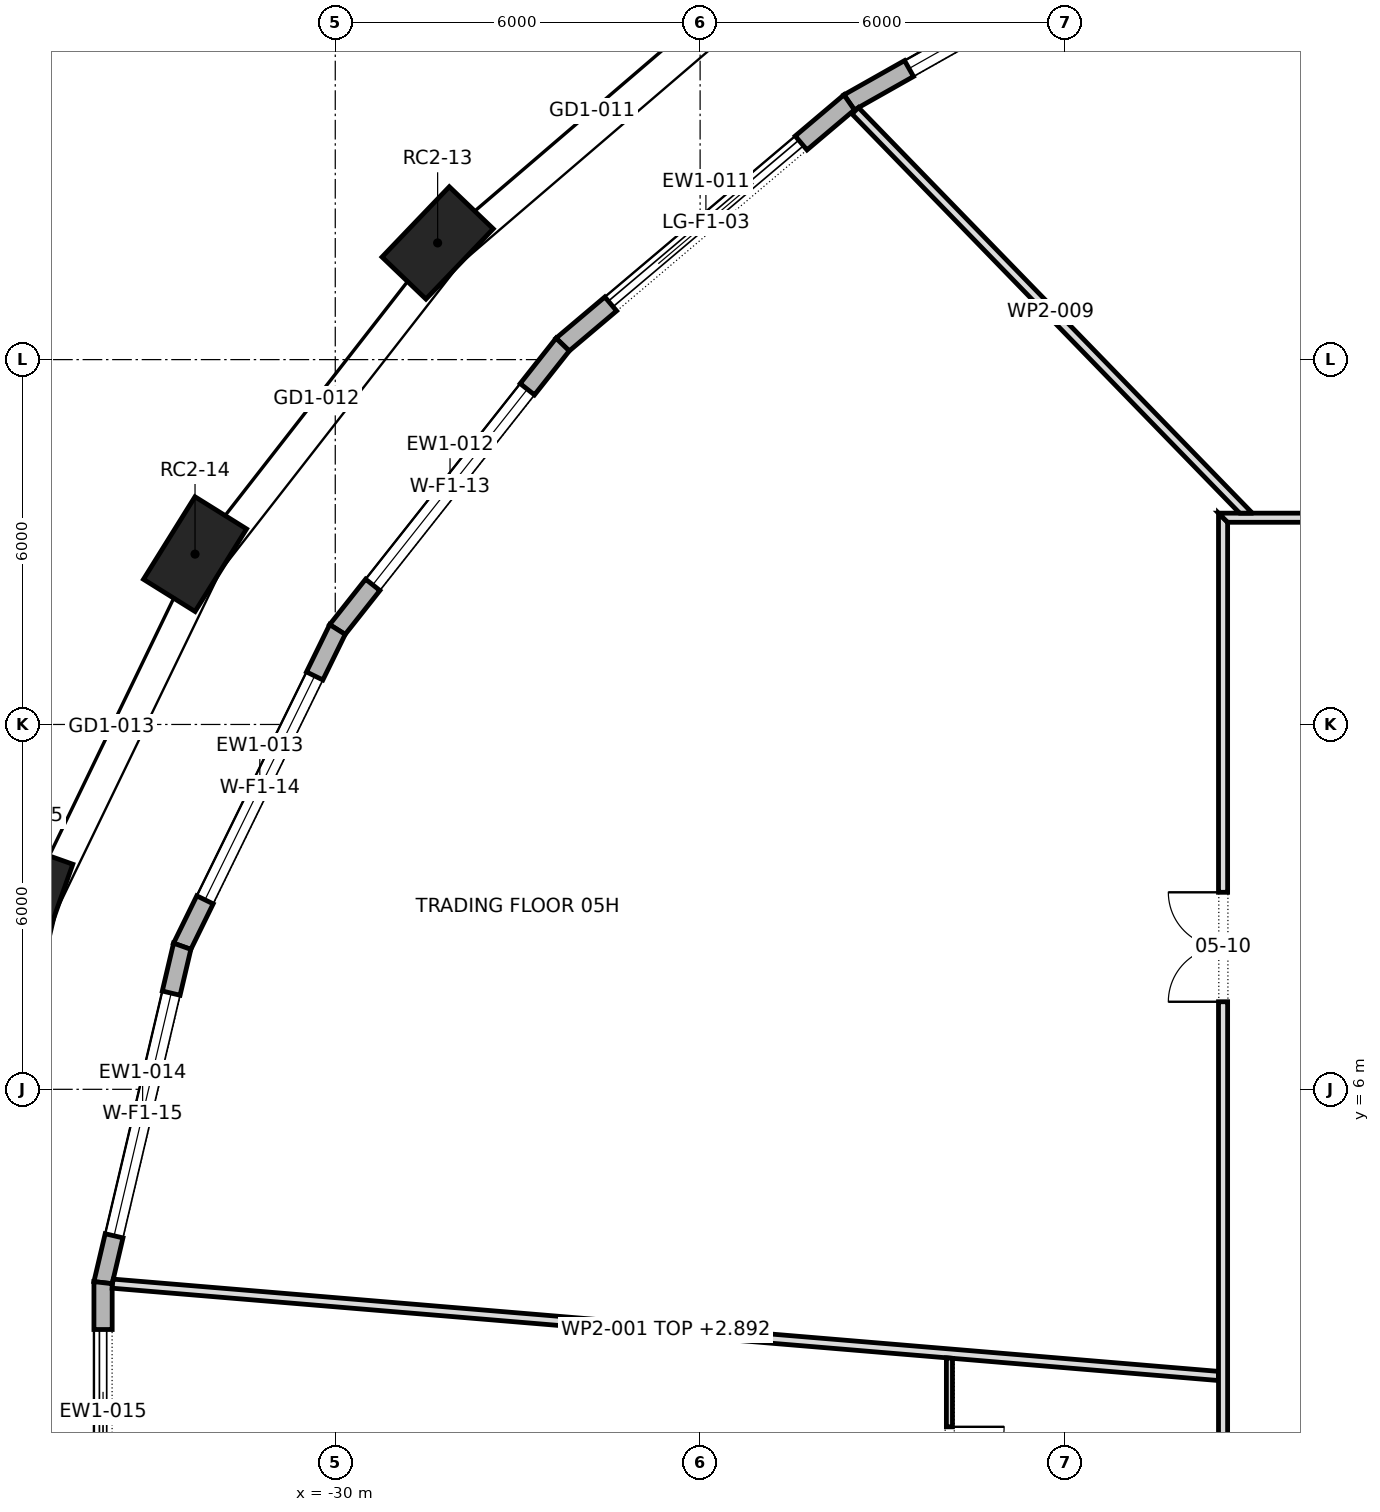
"""IFC4 building model, lengths in metres.
Left out: names, types, materials, properties, quantities, classifications, styles, units other than length and angle.
Written with IfcOpenShell. Run it as: python <this file> out.ifc"""

import sys

from ifc_helpers import new_model, si_unit, direction, frame, frame_2d, origin, origin_2d, place, context, subcontext, project, spatial, polyline, rectangle, outline, extrude, element, fill, save


model = new_model("IFC4")
c1 = context("Model", 3, precision=1e-05, world=origin(), true_north=direction((0.0, 1.0)))
c2 = subcontext(c1, "Body", "Model", "MODEL_VIEW")
j1 = project(units=[si_unit("LENGTHUNIT", "METRE"), si_unit("PLANEANGLEUNIT", "RADIAN")], contexts=[c1])
p1 = place(None, origin())
s1 = spatial("IfcSite", under=j1, at=p1, CompositionType="ELEMENT")
p2 = place(p1, origin())
s2 = spatial("IfcBuilding", under=s1, at=p2, CompositionType="ELEMENT")
p3 = place(p2, frame((0.0, 0.0, 73.9)))
s3 = spatial("IfcBuildingStorey", under=s2, at=p3, CompositionType="ELEMENT", Elevation=73.9)
for number, where, z_axis, x_axis in (
    (1, (-28.317, 19.919, 0.0), (0.0, 0.0, 1.0), (-0.692, -0.722, 0.0)),
    (2, (-32.306, 14.801, 0.0), (0.0, 0.0, 1.0), (-0.529, -0.849, 0.0)),
    (3, (-35.054, 9.115, 0.0), (0.0, 0.0, 1.0), (-0.334, -0.943, 0.0)),
):
    element("IfcColumn", number, at=place(p3, frame(where, z_axis=z_axis, x_axis=x_axis)), inside=s3, PredefinedType="COLUMN", context=c2, shape_type="SweptSolid", body=[
        extrude(rectangle(XDim=1.6, YDim=1.0, at=origin_2d()), origin(), (0.0, 0.0, 1.0), 4.2),
    ])
p4 = place(p3, frame((-16.01, 25.359, 0.0), z_axis=(0.0, 0.0, 1.0), x_axis=(-0.870710061474, -0.491796694629, 0.0)))
e4 = element("IfcWall", 4, at=p4, inside=s3, PredefinedType="STANDARD", context=c2, shape_type="SweptSolid", body=[
    extrude(outline(polyline([(-0.013, -0.15), (6.375, -0.15), (6.346, 0.15), (0.013, 0.15), (-0.013, -0.15)])), origin(), (0.0, 0.0, 1.0), 3.9),
])
p5 = place(p4, frame((1.13, 0.0, 0.6)))
e5 = element("IfcOpeningElement", 5, at=p5, cuts=e4, PredefinedType="OPENING", context=c2, shape_type="SweptSolid", body=[
    extrude(rectangle(XDim=4.1, YDim=2.85, at=frame_2d((2.05, 1.425))), frame((0.0, 0.162, 0.0), z_axis=(0.0, -1.0, 0.0), x_axis=(1.0, 0.0, 0.0)), (0.0, 0.0, 1.0), 0.324),
])
p6 = place(p3, frame((-21.549, 22.231, 0.0), z_axis=(0.0, 0.0, 1.0), x_axis=(-0.763693886759, -0.645578536916, 0.0)))
e6 = element("IfcWall", 6, at=p6, inside=s3, PredefinedType="STANDARD", context=c2, shape_type="SweptSolid", body=[
    extrude(outline(polyline([(-0.014, -0.15), (6.185, -0.15), (6.155, 0.15), (0.014, 0.15), (-0.014, -0.15)])), origin(), (0.0, 0.0, 1.0), 3.9),
])
p7 = place(p6, frame((1.035, 0.0, 0.0)))
e7 = element("IfcOpeningElement", 7, at=p7, cuts=e6, PredefinedType="OPENING", context=c2, shape_type="SweptSolid", body=[
    extrude(rectangle(XDim=4.1, YDim=3.45, at=frame_2d((2.05, 1.725))), frame((0.0, 0.162, 0.0), z_axis=(0.0, -1.0, 0.0), x_axis=(1.0, 0.0, 0.0)), (0.0, 0.0, 1.0), 0.324),
])
p8 = place(p3, frame((-26.26, 18.248, 0.0), z_axis=(0.0, 0.0, 1.0), x_axis=(-0.620093447965, -0.784527957303, 0.0)))
e8 = element("IfcWall", 8, at=p8, inside=s3, PredefinedType="STANDARD", context=c2, shape_type="SweptSolid", body=[
    extrude(outline(polyline([(-0.015, -0.15), (5.989, -0.15), (5.957, 0.15), (0.015, 0.15), (-0.015, -0.15)])), origin(), (0.0, 0.0, 1.0), 3.9),
])
p9 = place(p8, frame((0.937, 0.0, 0.6)))
e9 = element("IfcOpeningElement", 9, at=p9, cuts=e8, PredefinedType="OPENING", context=c2, shape_type="SweptSolid", body=[
    extrude(rectangle(XDim=4.1, YDim=2.85, at=frame_2d((2.05, 1.425))), frame((0.0, 0.162, 0.0), z_axis=(0.0, -1.0, 0.0), x_axis=(1.0, 0.0, 0.0)), (0.0, 0.0, 1.0), 0.324),
])
p10 = place(p3, frame((-29.964, 13.562, 0.0), z_axis=(0.0, 0.0, 1.0), x_axis=(-0.440027465772, -0.897984314655, 0.0)))
e10 = element("IfcWall", 10, at=p10, inside=s3, PredefinedType="STANDARD", context=c2, shape_type="SweptSolid", body=[
    extrude(outline(polyline([(-0.016, -0.15), (5.818, -0.15), (5.784, 0.15), (0.016, 0.15), (-0.016, -0.15)])), origin(), (0.0, 0.0, 1.0), 3.9),
])
p11 = place(p10, frame((0.85, 0.0, 0.6)))
e11 = element("IfcOpeningElement", 11, at=p11, cuts=e10, PredefinedType="OPENING", context=c2, shape_type="SweptSolid", body=[
    extrude(rectangle(XDim=4.1, YDim=2.85, at=frame_2d((2.05, 1.425))), frame((0.0, 0.162, 0.0), z_axis=(0.0, -1.0, 0.0), x_axis=(1.0, 0.0, 0.0)), (0.0, 0.0, 1.0), 0.324),
])
p12 = place(p3, frame((-32.517, 8.353, 0.0), z_axis=(0.0, 0.0, 1.0), x_axis=(-0.229058489262, -0.97341266095, 0.0)))
e12 = element("IfcWall", 12, at=p12, inside=s3, PredefinedType="STANDARD", context=c2, shape_type="SweptSolid", body=[
    extrude(outline(polyline([(-0.017, -0.15), (5.7, -0.15), (5.666, 0.15), (0.017, 0.15), (-0.017, -0.15)])), origin(), (0.0, 0.0, 1.0), 3.9),
])
p13 = place(p12, frame((0.792, 0.0, 0.6)))
e13 = element("IfcOpeningElement", 13, at=p13, cuts=e12, PredefinedType="OPENING", context=c2, shape_type="SweptSolid", body=[
    extrude(rectangle(XDim=4.1, YDim=2.85, at=frame_2d((2.05, 1.425))), frame((0.0, 0.162, 0.0), z_axis=(0.0, -1.0, 0.0), x_axis=(1.0, 0.0, 0.0)), (0.0, 0.0, 1.0), 0.324),
])
p14 = place(p3, frame((-33.819, 2.821, 0.0), z_axis=(0.0, 0.0, 1.0), x_axis=(0.0, -1.0, 0.0)))
e14 = element("IfcWall", 14, at=p14, inside=s3, PredefinedType="STANDARD", context=c2, shape_type="SweptSolid", body=[
    extrude(outline(polyline([(-0.017, -0.15), (5.658, -0.15), (5.624, 0.15), (0.017, 0.15), (-0.017, -0.15)])), origin(), (0.0, 0.0, 1.0), 3.9),
])
p15 = place(p14, frame((0.771, 0.0, 0.0)))
e15 = element("IfcOpeningElement", 15, at=p15, cuts=e14, PredefinedType="OPENING", context=c2, shape_type="SweptSolid", body=[
    extrude(rectangle(XDim=4.1, YDim=3.45, at=frame_2d((2.05, 1.725))), frame((0.0, 0.162, 0.0), z_axis=(0.0, -1.0, 0.0), x_axis=(1.0, 0.0, 0.0)), (0.0, 0.0, 1.0), 0.324),
])
p16 = place(p3, frame((-33.662, 2.804, 0.0), z_axis=(0.0, 0.0, 1.0), x_axis=(0.996534589799, -0.083179392484, 0.0)))
e16 = element("IfcWall", 16, at=p16, inside=s3, PredefinedType="PARTITIONING", context=c2, shape_type="SweptSolid", body=[
    extrude(outline(polyline([(18.256, -0.075), (18.256, -0.069), (18.244, 0.075), (16.42, 0.075), (14.596, 0.075), (12.773, 0.075), (10.949, 0.075), (9.125, 0.075), (7.301, 0.075), (5.477, 0.075), (3.653, 0.075), (1.829, 0.075), (0.005, 0.075), (0.0, 0.04), (0.0, -0.075), (1.826, -0.075), (3.651, -0.075), (5.477, -0.075), (7.302, -0.075), (9.128, -0.075), (10.954, -0.075), (12.78, -0.075), (14.605, -0.075), (16.431, -0.075), (18.256, -0.075)])), origin(), (0.0, 0.0, 1.0), 2.892),
])
p17 = place(p3, frame((-19.9, -13.744, 0.0), z_axis=(0.0, 0.0, 1.0), x_axis=(0.0, 1.0, 0.0)))
e17 = element("IfcWall", 17, at=p17, inside=s3, PredefinedType="PARTITIONING", context=c2, shape_type="SweptSolid", body=[
    extrude(outline(polyline([(0.069, -0.05), (1.976, -0.05), (3.882, -0.05), (5.788, -0.05), (7.695, -0.05), (9.601, -0.05), (11.508, -0.05), (13.414, -0.05), (15.321, -0.05), (15.329, 0.049), (15.329, 0.05), (13.644, 0.05), (11.958, 0.05), (10.273, 0.05), (8.588, 0.05), (8.58, 0.048), (8.58, 0.05), (6.864, 0.05), (5.148, 0.05), (3.432, 0.05), (1.716, 0.05), (0.0, 0.05), (0.0, 0.05), (0.069, -0.05)])), origin(), (0.0, 0.0, 1.0), 3.9),
])
p18 = place(p17, frame((3.844, 0.0, 0.0)))
e18 = element("IfcOpeningElement", 18, at=p18, cuts=e17, PredefinedType="OPENING", context=c2, shape_type="SweptSolid", body=[
    extrude(rectangle(XDim=0.9, YDim=2.1, at=frame_2d((0.45, 1.05))), frame((0.0, 0.062, 0.0), z_axis=(0.0, -1.0, 0.0), x_axis=(1.0, 0.0, 0.0)), (0.0, 0.0, 1.0), 0.124),
])
p19 = place(p17, frame((13.294, 0.0, 0.0)))
e19 = element("IfcOpeningElement", 19, at=p19, cuts=e17, PredefinedType="OPENING", context=c2, shape_type="SweptSolid", body=[
    extrude(rectangle(XDim=0.9, YDim=2.1, at=frame_2d((0.45, 1.05))), frame((0.0, 0.062, 0.0), z_axis=(0.0, -1.0, 0.0), x_axis=(1.0, 0.0, 0.0)), (0.0, 0.0, 1.0), 0.124),
])
p20 = place(p3, frame((-15.4, -15.475, 0.0), z_axis=(0.0, 0.0, 1.0), x_axis=(0.0, 1.0, 0.0)))
e20 = element("IfcWall", 20, at=p20, inside=s3, PredefinedType="PARTITIONING", context=c2, shape_type="SweptSolid", body=[
    extrude(outline(polyline([(0.15, -0.075), (2.066, -0.075), (3.981, -0.075), (5.897, -0.075), (7.812, -0.075), (9.728, -0.075), (11.644, -0.075), (13.56, -0.075), (15.475, -0.075), (17.391, -0.075), (19.306, -0.075), (21.222, -0.075), (23.138, -0.075), (25.053, -0.075), (26.969, -0.075), (28.885, -0.075), (30.8, -0.075), (30.95, 0.075), (29.016, 0.075), (27.081, 0.075), (25.147, 0.075), (23.212, 0.075), (21.278, 0.075), (19.344, 0.075), (17.409, 0.075), (15.475, 0.075), (13.541, 0.075), (11.606, 0.075), (9.672, 0.075), (7.738, 0.075), (5.803, 0.075), (3.869, 0.075), (1.935, 0.075), (0.0, 0.075), (0.15, -0.075)])), origin(), (0.0, 0.0, 1.0), 3.9),
])
p21 = place(p20, frame((10.275, 0.0, 0.0)))
e21 = element("IfcOpeningElement", 21, at=p21, cuts=e20, PredefinedType="OPENING", context=c2, shape_type="SweptSolid", body=[
    extrude(rectangle(XDim=1.0, YDim=2.1, at=frame_2d((0.5, 1.05))), frame((0.0, 0.087, 0.0), z_axis=(0.0, -1.0, 0.0), x_axis=(1.0, 0.0, 0.0)), (0.0, 0.0, 1.0), 0.174),
])
p22 = place(p20, frame((22.915, 0.0, 0.0)))
e22 = element("IfcOpeningElement", 22, at=p22, cuts=e20, PredefinedType="OPENING", context=c2, shape_type="SweptSolid", body=[
    extrude(rectangle(XDim=1.8, YDim=2.1, at=frame_2d((0.9, 1.05))), frame((0.0, 0.087, 0.0), z_axis=(0.0, -1.0, 0.0), x_axis=(1.0, 0.0, 0.0)), (0.0, 0.0, 1.0), 0.174),
])
p23 = place(p3, frame((-15.475, 15.4, 0.0), z_axis=(0.0, 0.0, 1.0), x_axis=(1.0, 0.0, 0.0)))
e23 = element("IfcWall", 23, at=p23, inside=s3, PredefinedType="PARTITIONING", context=c2, shape_type="SweptSolid", body=[
    extrude(outline(polyline([(0.15, -0.075), (2.066, -0.075), (3.981, -0.075), (5.897, -0.075), (7.812, -0.075), (9.728, -0.075), (11.644, -0.075), (13.56, -0.075), (15.475, -0.075), (17.391, -0.075), (19.306, -0.075), (21.222, -0.075), (23.138, -0.075), (25.053, -0.075), (26.969, -0.075), (28.885, -0.075), (30.8, -0.075), (30.95, 0.075), (29.016, 0.075), (27.081, 0.075), (25.147, 0.075), (23.212, 0.075), (21.278, 0.075), (19.344, 0.075), (17.409, 0.075), (15.475, 0.075), (13.541, 0.075), (11.606, 0.075), (9.672, 0.075), (7.738, 0.075), (5.803, 0.075), (3.869, 0.075), (1.935, 0.075), (0.0, 0.075), (0.15, -0.075)])), origin(), (0.0, 0.0, 1.0), 3.9),
])
p24 = place(p23, frame((26.573, 0.0, 0.0)))
e24 = element("IfcOpeningElement", 24, at=p24, cuts=e23, PredefinedType="OPENING", context=c2, shape_type="SweptSolid", body=[
    extrude(rectangle(XDim=1.8, YDim=2.1, at=frame_2d((0.9, 1.05))), frame((0.0, 0.087, 0.0), z_axis=(0.0, -1.0, 0.0), x_axis=(1.0, 0.0, 0.0)), (0.0, 0.0, 1.0), 0.174),
])
p25 = place(p23, frame((19.768, 0.0, 0.0)))
e25 = element("IfcOpeningElement", 25, at=p25, cuts=e23, PredefinedType="OPENING", context=c2, shape_type="SweptSolid", body=[
    extrude(rectangle(XDim=1.8, YDim=2.1, at=frame_2d((0.9, 1.05))), frame((0.0, 0.087, 0.0), z_axis=(0.0, -1.0, 0.0), x_axis=(1.0, 0.0, 0.0)), (0.0, 0.0, 1.0), 0.174),
])
p26 = place(p23, frame((7.995, 0.0, 0.0)))
e26 = element("IfcOpeningElement", 26, at=p26, cuts=e23, PredefinedType="OPENING", context=c2, shape_type="SweptSolid", body=[
    extrude(rectangle(XDim=1.8, YDim=2.1, at=frame_2d((0.9, 1.05))), frame((0.0, 0.087, 0.0), z_axis=(0.0, -1.0, 0.0), x_axis=(1.0, 0.0, 0.0)), (0.0, 0.0, 1.0), 0.174),
])
p27 = place(p3, frame((-14.972, 15.423, 0.0), z_axis=(0.0, 0.0, 1.0), x_axis=(-0.696670635557, 0.717391124529, 0.0)))
e27 = element("IfcWall", 27, at=p27, inside=s3, PredefinedType="PARTITIONING", context=c2, shape_type="SweptSolid", body=[
    extrude(outline(polyline([(9.296, 0.075), (7.466, 0.075), (5.636, 0.075), (3.806, 0.075), (1.975, 0.075), (0.145, 0.075), (0.0, -0.074), (0.0, -0.075), (1.859, -0.075), (3.719, -0.075), (5.578, -0.075), (7.437, -0.075), (9.296, -0.075), (9.296, 0.075)])), origin(), (0.0, 0.0, 1.0), 3.9),
])
p28 = place(p5, origin())
e28 = element("IfcWindow", 28, at=p28, inside=s3, PartitioningType="TRIPLE_PANEL_VERTICAL", PredefinedType="WINDOW", context=c2, shape_type="SweptSolid", body=[
    extrude(rectangle(XDim=4.1, YDim=2.85, at=frame_2d((2.05, 1.425))), frame((0.0, 0.03, 0.0), z_axis=(0.0, -1.0, 0.0), x_axis=(1.0, 0.0, 0.0)), (0.0, 0.0, 1.0), 0.06),
])
fill(e5, e28)
p29 = place(p7, origin())
e29 = element("IfcDoor", 29, at=p29, inside=s3, OperationType="DOUBLE_DOOR_SLIDING", PredefinedType="DOOR", context=c2, shape_type="SweptSolid", body=[
    extrude(rectangle(XDim=4.1, YDim=3.45, at=frame_2d((2.05, 1.725))), frame((0.0, 0.025, 0.0), z_axis=(0.0, -1.0, 0.0), x_axis=(1.0, 0.0, 0.0)), (0.0, 0.0, 1.0), 0.05),
])
fill(e7, e29)
p30 = place(p9, origin())
e30 = element("IfcWindow", 30, at=p30, inside=s3, PartitioningType="TRIPLE_PANEL_VERTICAL", PredefinedType="WINDOW", context=c2, shape_type="SweptSolid", body=[
    extrude(rectangle(XDim=4.1, YDim=2.85, at=frame_2d((2.05, 1.425))), frame((0.0, 0.03, 0.0), z_axis=(0.0, -1.0, 0.0), x_axis=(1.0, 0.0, 0.0)), (0.0, 0.0, 1.0), 0.06),
])
fill(e9, e30)
p31 = place(p11, origin())
e31 = element("IfcWindow", 31, at=p31, inside=s3, PartitioningType="TRIPLE_PANEL_VERTICAL", PredefinedType="WINDOW", context=c2, shape_type="SweptSolid", body=[
    extrude(rectangle(XDim=4.1, YDim=2.85, at=frame_2d((2.05, 1.425))), frame((0.0, 0.03, 0.0), z_axis=(0.0, -1.0, 0.0), x_axis=(1.0, 0.0, 0.0)), (0.0, 0.0, 1.0), 0.06),
])
fill(e11, e31)
p32 = place(p13, origin())
e32 = element("IfcWindow", 32, at=p32, inside=s3, PartitioningType="TRIPLE_PANEL_VERTICAL", PredefinedType="WINDOW", context=c2, shape_type="SweptSolid", body=[
    extrude(rectangle(XDim=4.1, YDim=2.85, at=frame_2d((2.05, 1.425))), frame((0.0, 0.03, 0.0), z_axis=(0.0, -1.0, 0.0), x_axis=(1.0, 0.0, 0.0)), (0.0, 0.0, 1.0), 0.06),
])
fill(e13, e32)
p33 = place(p15, origin())
e33 = element("IfcDoor", 33, at=p33, inside=s3, OperationType="DOUBLE_DOOR_SLIDING", PredefinedType="DOOR", context=c2, shape_type="SweptSolid", body=[
    extrude(rectangle(XDim=4.1, YDim=3.45, at=frame_2d((2.05, 1.725))), frame((0.0, 0.025, 0.0), z_axis=(0.0, -1.0, 0.0), x_axis=(1.0, 0.0, 0.0)), (0.0, 0.0, 1.0), 0.05),
])
fill(e15, e33)
p34 = place(p22, origin())
e34 = element("IfcDoor", 34, at=p34, inside=s3, OperationType="DOUBLE_DOOR_SINGLE_SWING", PredefinedType="DOOR", context=c2, shape_type="SweptSolid", body=[
    extrude(rectangle(XDim=1.8, YDim=2.1, at=frame_2d((0.9, 1.05))), frame((0.0, 0.025, 0.0), z_axis=(0.0, -1.0, 0.0), x_axis=(1.0, 0.0, 0.0)), (0.0, 0.0, 1.0), 0.05),
])
fill(e22, e34)
p35 = place(p19, frame((0.9, 0.0, 0.0), z_axis=(0.0, 0.0, 1.0), x_axis=(-1.0, 0.0, 0.0)))
e35 = element("IfcDoor", 35, at=p35, inside=s3, OperationType="SINGLE_SWING_RIGHT", PredefinedType="DOOR", context=c2, shape_type="SweptSolid", body=[
    extrude(rectangle(XDim=0.9, YDim=2.1, at=frame_2d((0.45, 1.05))), frame((0.0, 0.025, 0.0), z_axis=(0.0, -1.0, 0.0), x_axis=(1.0, 0.0, 0.0)), (0.0, 0.0, 1.0), 0.05),
])
fill(e19, e35)
save(model, sys.argv[1])
